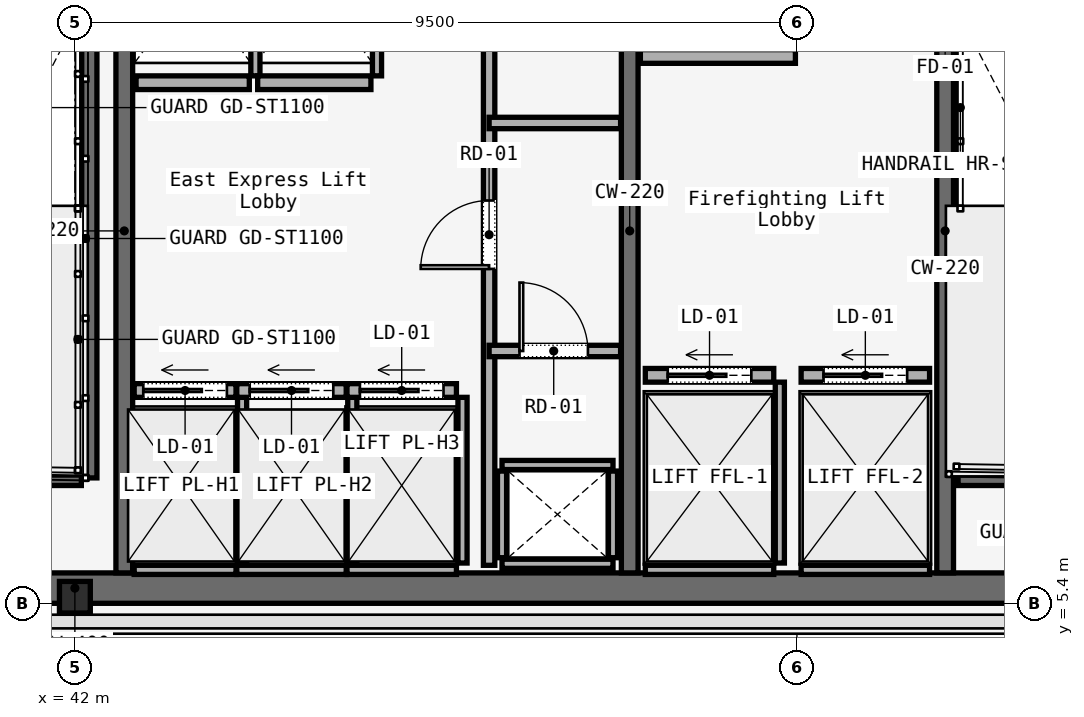
"""IFC4 building model, lengths in metres.
Left out: names, types, materials, properties, quantities, classifications, styles, units other than length and angle.
Written with IfcOpenShell. Run it as: python <this file> out.ifc"""

import sys

from ifc_helpers import new_model, si_unit, direction, frame, frame_2d, origin, origin_2d, place, context, subcontext, project, spatial, rectangle, i_section, extrude, element, fill, save


model = new_model("IFC4")
c1 = context("Model", 3, precision=1e-05, world=origin(), true_north=direction((0.0, 1.0)))
c2 = subcontext(c1, "Body", "Model", "MODEL_VIEW")
j1 = project(units=[si_unit("LENGTHUNIT", "METRE"), si_unit("PLANEANGLEUNIT", "RADIAN")], contexts=[c1])
p1 = place(None, origin())
s1 = spatial("IfcSite", under=j1, at=p1, CompositionType="ELEMENT")
p2 = place(p1, origin())
s2 = spatial("IfcBuilding", under=s1, at=p2, CompositionType="ELEMENT")
p3 = place(p2, frame((0.0, 0.0, 259.8)))
s3 = spatial("IfcBuildingStorey", under=s2, at=p3, CompositionType="ELEMENT", Elevation=259.8)
p4 = place(p3, frame((26.45, 5.6, 0.0), z_axis=(0.0, 0.0, 1.0), x_axis=(1.0, 0.0, 0.0)))
e1 = element("IfcWall", 1, at=p4, inside=s3, PredefinedType="SOLIDWALL", context=c2, shape_type="SweptSolid", body=[
    extrude(rectangle(XDim=31.1, YDim=0.4, at=frame_2d((15.55, 0.0))), origin(), (0.0, 0.0, 1.0), 3.58),
])
for number, where, z_axis, x_axis in (
    (2, (42.65, 5.8, 0.0), (0.0, 0.0, 1.0), (0.0, 1.0, 0.0)),
    (3, (49.3, 5.8, 0.0), (0.0, 0.0, 1.0), (0.0, 1.0, 0.0)),
):
    element("IfcWall", number, at=place(p3, frame(where, z_axis=z_axis, x_axis=x_axis)), inside=s3, PredefinedType="SOLIDWALL", context=c2, shape_type="SweptSolid", body=[
        extrude(rectangle(XDim=9.0, YDim=0.22, at=frame_2d((4.5, 0.0))), origin(), (0.0, 0.0, 1.0), 3.58),
    ])
p5 = place(p3, frame((53.45, 5.8, 0.0), z_axis=(0.0, 0.0, 1.0), x_axis=(0.0, 1.0, 0.0)))
e4 = element("IfcWall", 4, at=p5, inside=s3, PredefinedType="SOLIDWALL", context=c2, shape_type="SweptSolid", body=[
    extrude(rectangle(XDim=9.0, YDim=0.22, at=frame_2d((4.5, 0.0))), origin(), (0.0, 0.0, 1.0), 3.58),
])
p6 = place(p5, frame((7.5, 0.0, 0.0)))
e5 = element("IfcOpeningElement", 5, at=p6, cuts=e4, PredefinedType="OPENING", context=c2, shape_type="SweptSolid", body=[
    extrude(rectangle(XDim=1.1, YDim=2.2, at=frame_2d((0.55, 1.1))), frame((0.0, 0.11, 0.0), z_axis=(0.0, -1.0, 0.0), x_axis=(1.0, 0.0, 0.0)), (0.0, 0.0, 1.0), 0.22),
])
p7 = place(p3, frame((42.0, 5.48, 0.0), z_axis=(0.0, 0.0, 1.0), x_axis=(1.0, 0.0, 0.0)))
e6 = element("IfcColumn", 6, at=p7, inside=s3, PredefinedType="COLUMN", context=c2, shape_type="SweptSolid", body=[
    extrude(i_section(OverallWidth=0.406, OverallDepth=0.416, WebThickness=0.03, FlangeThickness=0.037, FilletRadius=0.015, at=origin_2d()), origin(), (0.0, 0.0, 1.0), 3.58),
])
p8 = place(p3, frame((42.19, 14.7, 0.0), z_axis=(0.0, 0.0, 1.0), x_axis=(0.0, -1.0, 0.0)))
e7 = element("IfcWall", 7, at=p8, inside=s3, PredefinedType="SOLIDWALL", context=c2, shape_type="SweptSolid", body=[
    extrude(rectangle(XDim=7.65, YDim=0.2, at=frame_2d((3.825, 0.0))), origin(), (0.0, 0.0, 1.0), 3.8),
])
for number, where, z_axis, x_axis in (
    (8, (38.97, 7.05, 0.0), (0.0, 0.0, 1.0), (1.0, 0.0, 0.0)),
    (9, (53.62, 7.05, 0.0), (0.0, 0.0, 1.0), (1.0, 0.0, 0.0)),
):
    element("IfcWall", number, at=place(p3, frame(where, z_axis=z_axis, x_axis=x_axis)), inside=s3, PredefinedType="SOLIDWALL", context=c2, shape_type="SweptSolid", body=[
        extrude(rectangle(XDim=3.115, YDim=0.2, at=frame_2d((1.558, 0.0))), origin(), (0.0, 0.0, 1.0), 3.8),
    ])
for number, where, z_axis, x_axis in (
    (10, (47.62, 5.92, 0.0), (0.0, 0.0, 1.0), (1.0, 0.0, 0.0)),
    (11, (47.62, 7.22, 0.0), (0.0, 0.0, 1.0), (1.0, 0.0, 0.0)),
):
    element("IfcWall", number, at=place(p3, frame(where, z_axis=z_axis, x_axis=x_axis)), inside=s3, PredefinedType="SOLIDWALL", context=c2, shape_type="SweptSolid", body=[
        extrude(rectangle(XDim=1.46, YDim=0.12, at=frame_2d((0.73, 0.0))), origin(), (0.0, 0.0, 1.0), 3.01),
    ])
for number, where, z_axis, x_axis in (
    (12, (47.62, 6.0, 0.0), (0.0, 0.0, 1.0), (0.0, 1.0, 0.0)),
    (13, (49.08, 6.0, 0.0), (0.0, 0.0, 1.0), (0.0, 1.0, 0.0)),
):
    element("IfcWall", number, at=place(p3, frame(where, z_axis=z_axis, x_axis=x_axis)), inside=s3, PredefinedType="SOLIDWALL", context=c2, shape_type="SweptSolid", body=[
        extrude(rectangle(XDim=1.14, YDim=0.12, at=frame_2d((0.57, 0.0))), origin(), (0.0, 0.0, 1.0), 3.01),
    ])
p9 = place(p3, frame((47.45, 5.9, 0.0), z_axis=(0.0, 0.0, 1.0), x_axis=(0.0, 1.0, 0.0)))
e14 = element("IfcWall", 14, at=p9, inside=s3, PredefinedType="PARTITIONING", context=c2, shape_type="SweptSolid", body=[
    extrude(rectangle(XDim=8.85, YDim=0.15, at=frame_2d((4.425, 0.0))), origin(), (0.0, 0.0, 1.0), 3.01),
])
p10 = place(p9, frame((3.9, 0.0, 0.0)))
e15 = element("IfcOpeningElement", 15, at=p10, cuts=e14, PredefinedType="OPENING", context=c2, shape_type="SweptSolid", body=[
    extrude(rectangle(XDim=0.9, YDim=2.1, at=frame_2d((0.45, 1.05))), frame((0.0, 0.075, 0.0), z_axis=(0.0, -1.0, 0.0), x_axis=(1.0, 0.0, 0.0)), (0.0, 0.0, 1.0), 0.15),
])
p11 = place(p3, frame((47.45, 8.72, 0.0), z_axis=(0.0, 0.0, 1.0), x_axis=(1.0, 0.0, 0.0)))
e16 = element("IfcWall", 16, at=p11, inside=s3, PredefinedType="PARTITIONING", context=c2, shape_type="SweptSolid", body=[
    extrude(rectangle(XDim=1.73, YDim=0.15, at=frame_2d((0.865, 0.0))), origin(), (0.0, 0.0, 1.0), 3.01),
])
p12 = place(p11, frame((0.4, 0.0, 0.0)))
e17 = element("IfcOpeningElement", 17, at=p12, cuts=e16, PredefinedType="OPENING", context=c2, shape_type="SweptSolid", body=[
    extrude(rectangle(XDim=0.9, YDim=2.1, at=frame_2d((0.45, 1.05))), frame((0.0, 0.075, 0.0), z_axis=(0.0, -1.0, 0.0), x_axis=(1.0, 0.0, 0.0)), (0.0, 0.0, 1.0), 0.15),
])
p13 = place(p3, frame((47.45, 11.72, 0.0), z_axis=(0.0, 0.0, 1.0), x_axis=(1.0, 0.0, 0.0)))
e18 = element("IfcWall", 18, at=p13, inside=s3, PredefinedType="PARTITIONING", context=c2, shape_type="SweptSolid", body=[
    extrude(rectangle(XDim=1.73, YDim=0.15, at=frame_2d((0.865, 0.0))), origin(), (0.0, 0.0, 1.0), 3.01),
])
p14 = place(p3, frame((42.78, 8.2, 0.0), z_axis=(0.0, 0.0, 1.0), x_axis=(1.0, 0.0, 0.0)))
e19 = element("IfcWall", 19, at=p14, inside=s3, PredefinedType="SOLIDWALL", context=c2, shape_type="SweptSolid", body=[
    extrude(rectangle(XDim=1.34, YDim=0.18, at=frame_2d((0.67, 0.0))), origin(), (0.0, 0.0, 1.0), 3.01),
])
p15 = place(p14, frame((0.12, 0.0, 0.0)))
e20 = element("IfcOpeningElement", 20, at=p15, cuts=e19, PredefinedType="OPENING", context=c2, shape_type="SweptSolid", body=[
    extrude(rectangle(XDim=1.1, YDim=2.2, at=frame_2d((0.55, 1.1))), frame((0.0, 0.09, 0.0), z_axis=(0.0, -1.0, 0.0), x_axis=(1.0, 0.0, 0.0)), (0.0, 0.0, 1.0), 0.18),
])
p16 = place(p3, frame((42.78, 5.84, 0.0), z_axis=(0.0, 0.0, 1.0), x_axis=(1.0, 0.0, 0.0)))
e21 = element("IfcWall", 21, at=p16, inside=s3, PredefinedType="SOLIDWALL", context=c2, shape_type="SweptSolid", body=[
    extrude(rectangle(XDim=1.34, YDim=0.12, at=frame_2d((0.67, 0.0))), origin(), (0.0, 0.0, 1.0), 3.01),
])
p17 = place(p3, frame((44.2, 5.93, 0.0), z_axis=(0.0, 0.0, 1.0), x_axis=(0.0, 1.0, 0.0)))
e22 = element("IfcWall", 22, at=p17, inside=s3, PredefinedType="SOLIDWALL", context=c2, shape_type="SweptSolid", body=[
    extrude(rectangle(XDim=2.18, YDim=0.12, at=frame_2d((1.09, 0.0))), origin(), (0.0, 0.0, 1.0), 3.01),
])
p18 = place(p3, frame((44.13, 8.2, 0.0), z_axis=(0.0, 0.0, 1.0), x_axis=(1.0, 0.0, 0.0)))
e23 = element("IfcWall", 23, at=p18, inside=s3, PredefinedType="SOLIDWALL", context=c2, shape_type="SweptSolid", body=[
    extrude(rectangle(XDim=1.44, YDim=0.18, at=frame_2d((0.72, 0.0))), origin(), (0.0, 0.0, 1.0), 3.01),
])
p19 = place(p18, frame((0.17, 0.0, 0.0)))
e24 = element("IfcOpeningElement", 24, at=p19, cuts=e23, PredefinedType="OPENING", context=c2, shape_type="SweptSolid", body=[
    extrude(rectangle(XDim=1.1, YDim=2.2, at=frame_2d((0.55, 1.1))), frame((0.0, 0.09, 0.0), z_axis=(0.0, -1.0, 0.0), x_axis=(1.0, 0.0, 0.0)), (0.0, 0.0, 1.0), 0.18),
])
p20 = place(p3, frame((44.13, 5.84, 0.0), z_axis=(0.0, 0.0, 1.0), x_axis=(1.0, 0.0, 0.0)))
e25 = element("IfcWall", 25, at=p20, inside=s3, PredefinedType="SOLIDWALL", context=c2, shape_type="SweptSolid", body=[
    extrude(rectangle(XDim=1.44, YDim=0.12, at=frame_2d((0.72, 0.0))), origin(), (0.0, 0.0, 1.0), 3.01),
])
p21 = place(p3, frame((45.65, 5.93, 0.0), z_axis=(0.0, 0.0, 1.0), x_axis=(0.0, 1.0, 0.0)))
e26 = element("IfcWall", 26, at=p21, inside=s3, PredefinedType="SOLIDWALL", context=c2, shape_type="SweptSolid", body=[
    extrude(rectangle(XDim=2.18, YDim=0.12, at=frame_2d((1.09, 0.0))), origin(), (0.0, 0.0, 1.0), 3.01),
])
p22 = place(p3, frame((45.58, 8.2, 0.0), z_axis=(0.0, 0.0, 1.0), x_axis=(1.0, 0.0, 0.0)))
e27 = element("IfcWall", 27, at=p22, inside=s3, PredefinedType="SOLIDWALL", context=c2, shape_type="SweptSolid", body=[
    extrude(rectangle(XDim=1.44, YDim=0.18, at=frame_2d((0.72, 0.0))), origin(), (0.0, 0.0, 1.0), 3.01),
])
p23 = place(p22, frame((0.17, 0.0, 0.0)))
e28 = element("IfcOpeningElement", 28, at=p23, cuts=e27, PredefinedType="OPENING", context=c2, shape_type="SweptSolid", body=[
    extrude(rectangle(XDim=1.1, YDim=2.2, at=frame_2d((0.55, 1.1))), frame((0.0, 0.09, 0.0), z_axis=(0.0, -1.0, 0.0), x_axis=(1.0, 0.0, 0.0)), (0.0, 0.0, 1.0), 0.18),
])
p24 = place(p3, frame((45.58, 5.84, 0.0), z_axis=(0.0, 0.0, 1.0), x_axis=(1.0, 0.0, 0.0)))
e29 = element("IfcWall", 29, at=p24, inside=s3, PredefinedType="SOLIDWALL", context=c2, shape_type="SweptSolid", body=[
    extrude(rectangle(XDim=1.44, YDim=0.12, at=frame_2d((0.72, 0.0))), origin(), (0.0, 0.0, 1.0), 3.01),
])
p25 = place(p3, frame((47.1, 5.93, 0.0), z_axis=(0.0, 0.0, 1.0), x_axis=(0.0, 1.0, 0.0)))
e30 = element("IfcWall", 30, at=p25, inside=s3, PredefinedType="SOLIDWALL", context=c2, shape_type="SweptSolid", body=[
    extrude(rectangle(XDim=2.18, YDim=0.12, at=frame_2d((1.09, 0.0))), origin(), (0.0, 0.0, 1.0), 3.01),
])
p26 = place(p3, frame((42.805, 12.25, 0.0), z_axis=(0.0, 0.0, 1.0), x_axis=(1.0, 0.0, 0.0)))
e31 = element("IfcWall", 31, at=p26, inside=s3, PredefinedType="SOLIDWALL", context=c2, shape_type="SweptSolid", body=[
    extrude(rectangle(XDim=1.49, YDim=0.18, at=frame_2d((0.745, 0.0))), origin(), (0.0, 0.0, 1.0), 3.01),
])
p27 = place(p3, frame((44.375, 12.34, 0.0), z_axis=(0.0, 0.0, 1.0), x_axis=(0.0, 1.0, 0.0)))
e32 = element("IfcWall", 32, at=p27, inside=s3, PredefinedType="SOLIDWALL", context=c2, shape_type="SweptSolid", body=[
    extrude(rectangle(XDim=2.23, YDim=0.12, at=frame_2d((1.115, 0.0))), origin(), (0.0, 0.0, 1.0), 3.01),
])
p28 = place(p3, frame((44.405, 12.25, 0.0), z_axis=(0.0, 0.0, 1.0), x_axis=(1.0, 0.0, 0.0)))
e33 = element("IfcWall", 33, at=p28, inside=s3, PredefinedType="SOLIDWALL", context=c2, shape_type="SweptSolid", body=[
    extrude(rectangle(XDim=1.49, YDim=0.18, at=frame_2d((0.745, 0.0))), origin(), (0.0, 0.0, 1.0), 3.01),
])
p29 = place(p3, frame((45.975, 12.34, 0.0), z_axis=(0.0, 0.0, 1.0), x_axis=(0.0, 1.0, 0.0)))
e34 = element("IfcWall", 34, at=p29, inside=s3, PredefinedType="SOLIDWALL", context=c2, shape_type="SweptSolid", body=[
    extrude(rectangle(XDim=2.23, YDim=0.12, at=frame_2d((1.115, 0.0))), origin(), (0.0, 0.0, 1.0), 3.01),
])
p30 = place(p3, frame((49.505, 8.4, 0.0), z_axis=(0.0, 0.0, 1.0), x_axis=(1.0, 0.0, 0.0)))
e35 = element("IfcWall", 35, at=p30, inside=s3, PredefinedType="SOLIDWALL", context=c2, shape_type="SweptSolid", body=[
    extrude(rectangle(XDim=1.69, YDim=0.18, at=frame_2d((0.845, 0.0))), origin(), (0.0, 0.0, 1.0), 3.01),
])
p31 = place(p30, frame((0.295, 0.0, 0.0)))
e36 = element("IfcOpeningElement", 36, at=p31, cuts=e35, PredefinedType="OPENING", context=c2, shape_type="SweptSolid", body=[
    extrude(rectangle(XDim=1.1, YDim=2.2, at=frame_2d((0.55, 1.1))), frame((0.0, 0.09, 0.0), z_axis=(0.0, -1.0, 0.0), x_axis=(1.0, 0.0, 0.0)), (0.0, 0.0, 1.0), 0.18),
])
p32 = place(p3, frame((49.505, 5.84, 0.0), z_axis=(0.0, 0.0, 1.0), x_axis=(1.0, 0.0, 0.0)))
e37 = element("IfcWall", 37, at=p32, inside=s3, PredefinedType="SOLIDWALL", context=c2, shape_type="SweptSolid", body=[
    extrude(rectangle(XDim=1.69, YDim=0.12, at=frame_2d((0.845, 0.0))), origin(), (0.0, 0.0, 1.0), 3.01),
])
p33 = place(p3, frame((51.275, 5.93, 0.0), z_axis=(0.0, 0.0, 1.0), x_axis=(0.0, 1.0, 0.0)))
e38 = element("IfcWall", 38, at=p33, inside=s3, PredefinedType="SOLIDWALL", context=c2, shape_type="SweptSolid", body=[
    extrude(rectangle(XDim=2.38, YDim=0.12, at=frame_2d((1.19, 0.0))), origin(), (0.0, 0.0, 1.0), 3.01),
])
p34 = place(p3, frame((51.555, 8.4, 0.0), z_axis=(0.0, 0.0, 1.0), x_axis=(1.0, 0.0, 0.0)))
e39 = element("IfcWall", 39, at=p34, inside=s3, PredefinedType="SOLIDWALL", context=c2, shape_type="SweptSolid", body=[
    extrude(rectangle(XDim=1.69, YDim=0.18, at=frame_2d((0.845, 0.0))), origin(), (0.0, 0.0, 1.0), 3.01),
])
p35 = place(p34, frame((0.295, 0.0, 0.0)))
e40 = element("IfcOpeningElement", 40, at=p35, cuts=e39, PredefinedType="OPENING", context=c2, shape_type="SweptSolid", body=[
    extrude(rectangle(XDim=1.1, YDim=2.2, at=frame_2d((0.55, 1.1))), frame((0.0, 0.09, 0.0), z_axis=(0.0, -1.0, 0.0), x_axis=(1.0, 0.0, 0.0)), (0.0, 0.0, 1.0), 0.18),
])
p36 = place(p3, frame((51.555, 5.84, 0.0), z_axis=(0.0, 0.0, 1.0), x_axis=(1.0, 0.0, 0.0)))
e41 = element("IfcWall", 41, at=p36, inside=s3, PredefinedType="SOLIDWALL", context=c2, shape_type="SweptSolid", body=[
    extrude(rectangle(XDim=1.69, YDim=0.12, at=frame_2d((0.845, 0.0))), origin(), (0.0, 0.0, 1.0), 3.01),
])
p37 = place(p3, frame((49.44, 12.595, 0.0), z_axis=(0.0, 0.0, 1.0), x_axis=(1.0, 0.0, 0.0)))
e42 = element("IfcWall", 42, at=p37, inside=s3, PredefinedType="SOLIDWALL", context=c2, shape_type="SweptSolid", body=[
    extrude(rectangle(XDim=2.04, YDim=0.18, at=frame_2d((1.02, 0.0))), origin(), (0.0, 0.0, 1.0), 3.01),
])
p38 = place(p10, origin())
e43 = element("IfcDoor", 43, at=p38, inside=s3, OperationType="SINGLE_SWING_LEFT", PredefinedType="DOOR", context=c2, shape_type="SweptSolid", body=[
    extrude(rectangle(XDim=0.9, YDim=2.1, at=frame_2d((0.45, 1.05))), frame((0.0, 0.025, 0.0), z_axis=(0.0, -1.0, 0.0), x_axis=(1.0, 0.0, 0.0)), (0.0, 0.0, 1.0), 0.05),
])
fill(e15, e43)
p39 = place(p12, origin())
e44 = element("IfcDoor", 44, at=p39, inside=s3, OperationType="SINGLE_SWING_RIGHT", PredefinedType="DOOR", context=c2, shape_type="SweptSolid", body=[
    extrude(rectangle(XDim=0.9, YDim=2.1, at=frame_2d((0.45, 1.05))), frame((0.0, 0.025, 0.0), z_axis=(0.0, -1.0, 0.0), x_axis=(1.0, 0.0, 0.0)), (0.0, 0.0, 1.0), 0.05),
])
fill(e17, e44)
p40 = place(p15, origin())
e45 = element("IfcDoor", 45, at=p40, inside=s3, OperationType="SLIDING_TO_LEFT", PredefinedType="DOOR", context=c2, shape_type="SweptSolid", body=[
    extrude(rectangle(XDim=1.1, YDim=2.2, at=frame_2d((0.55, 1.1))), frame((0.0, 0.025, 0.0), z_axis=(0.0, -1.0, 0.0), x_axis=(1.0, 0.0, 0.0)), (0.0, 0.0, 1.0), 0.05),
])
fill(e20, e45)
p41 = place(p19, origin())
e46 = element("IfcDoor", 46, at=p41, inside=s3, OperationType="SLIDING_TO_LEFT", PredefinedType="DOOR", context=c2, shape_type="SweptSolid", body=[
    extrude(rectangle(XDim=1.1, YDim=2.2, at=frame_2d((0.55, 1.1))), frame((0.0, 0.025, 0.0), z_axis=(0.0, -1.0, 0.0), x_axis=(1.0, 0.0, 0.0)), (0.0, 0.0, 1.0), 0.05),
])
fill(e24, e46)
p42 = place(p23, origin())
e47 = element("IfcDoor", 47, at=p42, inside=s3, OperationType="SLIDING_TO_LEFT", PredefinedType="DOOR", context=c2, shape_type="SweptSolid", body=[
    extrude(rectangle(XDim=1.1, YDim=2.2, at=frame_2d((0.55, 1.1))), frame((0.0, 0.025, 0.0), z_axis=(0.0, -1.0, 0.0), x_axis=(1.0, 0.0, 0.0)), (0.0, 0.0, 1.0), 0.05),
])
fill(e28, e47)
p43 = place(p31, origin())
e48 = element("IfcDoor", 48, at=p43, inside=s3, OperationType="SLIDING_TO_LEFT", PredefinedType="DOOR", context=c2, shape_type="SweptSolid", body=[
    extrude(rectangle(XDim=1.1, YDim=2.2, at=frame_2d((0.55, 1.1))), frame((0.0, 0.025, 0.0), z_axis=(0.0, -1.0, 0.0), x_axis=(1.0, 0.0, 0.0)), (0.0, 0.0, 1.0), 0.05),
])
fill(e36, e48)
p44 = place(p35, origin())
e49 = element("IfcDoor", 49, at=p44, inside=s3, OperationType="SLIDING_TO_LEFT", PredefinedType="DOOR", context=c2, shape_type="SweptSolid", body=[
    extrude(rectangle(XDim=1.1, YDim=2.2, at=frame_2d((0.55, 1.1))), frame((0.0, 0.025, 0.0), z_axis=(0.0, -1.0, 0.0), x_axis=(1.0, 0.0, 0.0)), (0.0, 0.0, 1.0), 0.05),
])
fill(e40, e49)
save(model, sys.argv[1])
